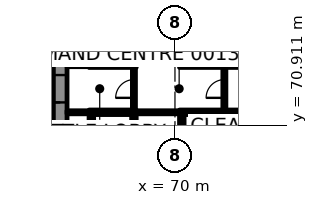
"""IFC4 building model, lengths in metres.
Left out: names, types, materials, properties, quantities, classifications, styles, units other than length and angle.
Written with IfcOpenShell. Run it as: python <this file> out.ifc"""

import sys

from ifc_helpers import new_model, si_unit, direction, frame, frame_2d, origin, place, context, subcontext, project, spatial, rectangle, extrude, element, fill, save


model = new_model("IFC4")
c1 = context("Model", 3, precision=1e-05, world=origin(), true_north=direction((0.0, 1.0)))
c2 = subcontext(c1, "Body", "Model", "MODEL_VIEW")
j1 = project(units=[si_unit("LENGTHUNIT", "METRE"), si_unit("PLANEANGLEUNIT", "RADIAN")], contexts=[c1])
p1 = place(None, origin())
s1 = spatial("IfcSite", under=j1, at=p1, CompositionType="ELEMENT")
p2 = place(p1, origin())
s2 = spatial("IfcBuilding", under=s1, at=p2, CompositionType="ELEMENT")
p3 = place(p2, origin())
s3 = spatial("IfcBuildingStorey", under=s2, at=p3, CompositionType="ELEMENT", Elevation=0.0)
p4 = place(p3, frame((62.45, 66.9, 0.0), z_axis=(0.0, 0.0, 1.0), x_axis=(0.0, 1.0, 0.0)))
e1 = element("IfcWall", 1, at=p4, inside=s3, PredefinedType="SHEAR", context=c2, shape_type="SweptSolid", body=[
    extrude(rectangle(XDim=16.2, YDim=0.9, at=frame_2d((8.1, 0.0))), origin(), (0.0, 0.0, 1.0), 7.7),
])
p5 = place(p4, frame((5.5, 0.0, 0.0)))
e2 = element("IfcOpeningElement", 2, at=p5, cuts=e1, PredefinedType="OPENING", context=c2, shape_type="SweptSolid", body=[
    extrude(rectangle(XDim=1.8, YDim=2.1, at=frame_2d((0.9, 1.05))), frame((0.0, 0.46, 0.0), z_axis=(0.0, -1.0, 0.0), x_axis=(1.0, 0.0, 0.0)), (0.0, 0.0, 1.0), 0.92),
])
p6 = place(p3, frame((64.35, 71.75, 0.0), z_axis=(0.0, 0.0, 1.0), x_axis=(1.0, 0.0, 0.0)))
e3 = element("IfcWall", 3, at=p6, inside=s3, PredefinedType="SHEAR", context=c2, shape_type="SweptSolid", body=[
    extrude(rectangle(XDim=3.1, YDim=0.3, at=frame_2d((1.55, 0.0))), origin(), (0.0, 0.0, 1.0), 7.7),
])
p7 = place(p6, frame((1.0, 0.0, 0.0)))
e4 = element("IfcOpeningElement", 4, at=p7, cuts=e3, PredefinedType="OPENING", context=c2, shape_type="SweptSolid", body=[
    extrude(rectangle(XDim=1.1, YDim=2.1, at=frame_2d((0.55, 1.05))), frame((0.0, 0.16, 0.0), z_axis=(0.0, -1.0, 0.0), x_axis=(1.0, 0.0, 0.0)), (0.0, 0.0, 1.0), 0.32),
])
p8 = place(p3, frame((70.3, 71.75, 0.0), z_axis=(0.0, 0.0, 1.0), x_axis=(1.0, 0.0, 0.0)))
e5 = element("IfcWall", 5, at=p8, inside=s3, PredefinedType="SHEAR", context=c2, shape_type="SweptSolid", body=[
    extrude(rectangle(XDim=16.8, YDim=0.3, at=frame_2d((8.4, 0.0))), origin(), (0.0, 0.0, 1.0), 7.7),
])
p9 = place(p8, frame((1.0, 0.0, 0.0)))
e6 = element("IfcOpeningElement", 6, at=p9, cuts=e5, PredefinedType="OPENING", context=c2, shape_type="SweptSolid", body=[
    extrude(rectangle(XDim=1.1, YDim=2.1, at=frame_2d((0.55, 1.05))), frame((0.0, 0.16, 0.0), z_axis=(0.0, -1.0, 0.0), x_axis=(1.0, 0.0, 0.0)), (0.0, 0.0, 1.0), 0.32),
])
p10 = place(p8, frame((3.8, 0.0, 0.0)))
e7 = element("IfcOpeningElement", 7, at=p10, cuts=e5, PredefinedType="OPENING", context=c2, shape_type="SweptSolid", body=[
    extrude(rectangle(XDim=1.1, YDim=2.1, at=frame_2d((0.55, 1.05))), frame((0.0, 0.16, 0.0), z_axis=(0.0, -1.0, 0.0), x_axis=(1.0, 0.0, 0.0)), (0.0, 0.0, 1.0), 0.32),
])
p11 = place(p8, frame((6.6, 0.0, 0.0)))
e8 = element("IfcOpeningElement", 8, at=p11, cuts=e5, PredefinedType="OPENING", context=c2, shape_type="SweptSolid", body=[
    extrude(rectangle(XDim=1.1, YDim=2.1, at=frame_2d((0.55, 1.05))), frame((0.0, 0.16, 0.0), z_axis=(0.0, -1.0, 0.0), x_axis=(1.0, 0.0, 0.0)), (0.0, 0.0, 1.0), 0.32),
])
p12 = place(p8, frame((9.4, 0.0, 0.0)))
e9 = element("IfcOpeningElement", 9, at=p12, cuts=e5, PredefinedType="OPENING", context=c2, shape_type="SweptSolid", body=[
    extrude(rectangle(XDim=1.1, YDim=2.1, at=frame_2d((0.55, 1.05))), frame((0.0, 0.16, 0.0), z_axis=(0.0, -1.0, 0.0), x_axis=(1.0, 0.0, 0.0)), (0.0, 0.0, 1.0), 0.32),
])
p13 = place(p8, frame((12.2, 0.0, 0.0)))
e10 = element("IfcOpeningElement", 10, at=p13, cuts=e5, PredefinedType="OPENING", context=c2, shape_type="SweptSolid", body=[
    extrude(rectangle(XDim=1.1, YDim=2.1, at=frame_2d((0.55, 1.05))), frame((0.0, 0.16, 0.0), z_axis=(0.0, -1.0, 0.0), x_axis=(1.0, 0.0, 0.0)), (0.0, 0.0, 1.0), 0.32),
])
p14 = place(p8, frame((14.925, 0.0, 0.0)))
e11 = element("IfcOpeningElement", 11, at=p14, cuts=e5, PredefinedType="OPENING", context=c2, shape_type="SweptSolid", body=[
    extrude(rectangle(XDim=1.1, YDim=2.1, at=frame_2d((0.55, 1.05))), frame((0.0, 0.16, 0.0), z_axis=(0.0, -1.0, 0.0), x_axis=(1.0, 0.0, 0.0)), (0.0, 0.0, 1.0), 0.32),
])
p15 = place(p3, frame((64.35, 74.85, 0.0), z_axis=(0.0, 0.0, 1.0), x_axis=(1.0, 0.0, 0.0)))
e12 = element("IfcWall", 12, at=p15, inside=s3, PredefinedType="SHEAR", context=c2, shape_type="SweptSolid", body=[
    extrude(rectangle(XDim=3.1, YDim=0.3, at=frame_2d((1.55, 0.0))), origin(), (0.0, 0.0, 1.0), 7.7),
])
p16 = place(p15, frame((1.0, 0.0, 0.0)))
e13 = element("IfcOpeningElement", 13, at=p16, cuts=e12, PredefinedType="OPENING", context=c2, shape_type="SweptSolid", body=[
    extrude(rectangle(XDim=1.1, YDim=2.1, at=frame_2d((0.55, 1.05))), frame((0.0, 0.16, 0.0), z_axis=(0.0, -1.0, 0.0), x_axis=(1.0, 0.0, 0.0)), (0.0, 0.0, 1.0), 0.32),
])
p17 = place(p3, frame((70.3, 74.85, 0.0), z_axis=(0.0, 0.0, 1.0), x_axis=(1.0, 0.0, 0.0)))
e14 = element("IfcWall", 14, at=p17, inside=s3, PredefinedType="SHEAR", context=c2, shape_type="SweptSolid", body=[
    extrude(rectangle(XDim=16.8, YDim=0.3, at=frame_2d((8.4, 0.0))), origin(), (0.0, 0.0, 1.0), 7.7),
])
p18 = place(p17, frame((3.8, 0.0, 0.0)))
e15 = element("IfcOpeningElement", 15, at=p18, cuts=e14, PredefinedType="OPENING", context=c2, shape_type="SweptSolid", body=[
    extrude(rectangle(XDim=1.1, YDim=2.1, at=frame_2d((0.55, 1.05))), frame((0.0, 0.16, 0.0), z_axis=(0.0, -1.0, 0.0), x_axis=(1.0, 0.0, 0.0)), (0.0, 0.0, 1.0), 0.32),
])
p19 = place(p17, frame((6.6, 0.0, 0.0)))
e16 = element("IfcOpeningElement", 16, at=p19, cuts=e14, PredefinedType="OPENING", context=c2, shape_type="SweptSolid", body=[
    extrude(rectangle(XDim=1.1, YDim=2.1, at=frame_2d((0.55, 1.05))), frame((0.0, 0.16, 0.0), z_axis=(0.0, -1.0, 0.0), x_axis=(1.0, 0.0, 0.0)), (0.0, 0.0, 1.0), 0.32),
])
p20 = place(p17, frame((9.4, 0.0, 0.0)))
e17 = element("IfcOpeningElement", 17, at=p20, cuts=e14, PredefinedType="OPENING", context=c2, shape_type="SweptSolid", body=[
    extrude(rectangle(XDim=1.1, YDim=2.1, at=frame_2d((0.55, 1.05))), frame((0.0, 0.16, 0.0), z_axis=(0.0, -1.0, 0.0), x_axis=(1.0, 0.0, 0.0)), (0.0, 0.0, 1.0), 0.32),
])
p21 = place(p17, frame((12.2, 0.0, 0.0)))
e18 = element("IfcOpeningElement", 18, at=p21, cuts=e14, PredefinedType="OPENING", context=c2, shape_type="SweptSolid", body=[
    extrude(rectangle(XDim=1.1, YDim=2.1, at=frame_2d((0.55, 1.05))), frame((0.0, 0.16, 0.0), z_axis=(0.0, -1.0, 0.0), x_axis=(1.0, 0.0, 0.0)), (0.0, 0.0, 1.0), 0.32),
])
p22 = place(p17, frame((14.925, 0.0, 0.0)))
e19 = element("IfcOpeningElement", 19, at=p22, cuts=e14, PredefinedType="OPENING", context=c2, shape_type="SweptSolid", body=[
    extrude(rectangle(XDim=1.1, YDim=2.1, at=frame_2d((0.55, 1.05))), frame((0.0, 0.16, 0.0), z_axis=(0.0, -1.0, 0.0), x_axis=(1.0, 0.0, 0.0)), (0.0, 0.0, 1.0), 0.32),
])
for number, where, z_axis, x_axis in (
    (20, (64.5, 69.0, 0.0), (0.0, 0.0, 1.0), (0.0, 1.0, 0.0)),
    (21, (64.5, 75.0, 0.0), (0.0, 0.0, 1.0), (0.0, 1.0, 0.0)),
    (22, (67.3, 69.0, 0.0), (0.0, 0.0, 1.0), (0.0, 1.0, 0.0)),
    (23, (67.3, 75.0, 0.0), (0.0, 0.0, 1.0), (0.0, 1.0, 0.0)),
    (24, (70.45, 69.0, 0.0), (0.0, 0.0, 1.0), (0.0, 1.0, 0.0)),
):
    element("IfcWall", number, at=place(p3, frame(where, z_axis=z_axis, x_axis=x_axis)), inside=s3, PredefinedType="SHEAR", context=c2, shape_type="SweptSolid", body=[
        extrude(rectangle(XDim=2.6, YDim=0.3, at=frame_2d((1.3, 0.0))), origin(), (0.0, 0.0, 1.0), 7.7),
    ])
p23 = place(p3, frame((70.45, 75.0, 0.0), z_axis=(0.0, 0.0, 1.0), x_axis=(0.0, 1.0, 0.0)))
e25 = element("IfcWall", 25, at=p23, inside=s3, PredefinedType="SHEAR", context=c2, shape_type="SweptSolid", body=[
    extrude(rectangle(XDim=2.6, YDim=0.3, at=frame_2d((1.3, 0.0))), origin(), (0.0, 0.0, 1.0), 7.7),
])
p24 = place(p23, frame((0.15, 0.0, 0.0)))
e26 = element("IfcOpeningElement", 26, at=p24, cuts=e25, PredefinedType="OPENING", context=c2, shape_type="SweptSolid", body=[
    extrude(rectangle(XDim=1.1, YDim=2.1, at=frame_2d((0.55, 1.05))), frame((0.0, 0.16, 0.0), z_axis=(0.0, -1.0, 0.0), x_axis=(1.0, 0.0, 0.0)), (0.0, 0.0, 1.0), 0.32),
])
for number, where, z_axis, x_axis in (
    (27, (73.25, 69.0, 0.0), (0.0, 0.0, 1.0), (0.0, 1.0, 0.0)),
    (28, (73.25, 75.0, 0.0), (0.0, 0.0, 1.0), (0.0, 1.0, 0.0)),
):
    element("IfcWall", number, at=place(p3, frame(where, z_axis=z_axis, x_axis=x_axis)), inside=s3, PredefinedType="SHEAR", context=c2, shape_type="SweptSolid", body=[
        extrude(rectangle(XDim=2.6, YDim=0.3, at=frame_2d((1.3, 0.0))), origin(), (0.0, 0.0, 1.0), 7.7),
    ])
p25 = place(p3, frame((71.348, 110.424, 0.0), z_axis=(0.0, 0.0, 1.0), x_axis=(-0.500000550228, -0.86602508611, 0.0)))
e29 = element("IfcWall", 29, at=p25, inside=s3, PredefinedType="SOLIDWALL", context=c2, shape_type="SweptSolid", body=[
    extrude(rectangle(XDim=57.704, YDim=0.3, at=frame_2d((28.852, 0.0))), origin(), (0.0, 0.0, 1.0), 7.7),
])
p26 = place(p25, frame((16.711, 0.0, 0.0)))
e30 = element("IfcOpeningElement", 30, at=p26, cuts=e29, PredefinedType="OPENING", context=c2, shape_type="SweptSolid", body=[
    extrude(rectangle(XDim=1.2, YDim=2.4, at=frame_2d((0.6, 1.2))), frame((0.0, 0.16, 0.0), z_axis=(0.0, -1.0, 0.0), x_axis=(1.0, 0.0, 0.0)), (0.0, 0.0, 1.0), 0.32),
])
p27 = place(p25, frame((1.552, 0.0, 0.15)))
e31 = element("IfcOpeningElement", 31, at=p27, cuts=e29, PredefinedType="OPENING", context=c2, shape_type="SweptSolid", body=[
    extrude(rectangle(XDim=2.1, YDim=5.4, at=frame_2d((1.05, 2.7))), frame((0.0, 0.16, 0.0), z_axis=(0.0, -1.0, 0.0), x_axis=(1.0, 0.0, 0.0)), (0.0, 0.0, 1.0), 0.32),
])
p28 = place(p25, frame((4.052, 0.0, 0.15)))
e32 = element("IfcOpeningElement", 32, at=p28, cuts=e29, PredefinedType="OPENING", context=c2, shape_type="SweptSolid", body=[
    extrude(rectangle(XDim=2.1, YDim=5.4, at=frame_2d((1.05, 2.7))), frame((0.0, 0.16, 0.0), z_axis=(0.0, -1.0, 0.0), x_axis=(1.0, 0.0, 0.0)), (0.0, 0.0, 1.0), 0.32),
])
p29 = place(p25, frame((6.552, 0.0, 0.15)))
e33 = element("IfcOpeningElement", 33, at=p29, cuts=e29, PredefinedType="OPENING", context=c2, shape_type="SweptSolid", body=[
    extrude(rectangle(XDim=2.1, YDim=5.4, at=frame_2d((1.05, 2.7))), frame((0.0, 0.16, 0.0), z_axis=(0.0, -1.0, 0.0), x_axis=(1.0, 0.0, 0.0)), (0.0, 0.0, 1.0), 0.32),
])
p30 = place(p25, frame((9.052, 0.0, 0.15)))
e34 = element("IfcOpeningElement", 34, at=p30, cuts=e29, PredefinedType="OPENING", context=c2, shape_type="SweptSolid", body=[
    extrude(rectangle(XDim=2.1, YDim=5.4, at=frame_2d((1.05, 2.7))), frame((0.0, 0.16, 0.0), z_axis=(0.0, -1.0, 0.0), x_axis=(1.0, 0.0, 0.0)), (0.0, 0.0, 1.0), 0.32),
])
p31 = place(p25, frame((11.552, 0.0, 0.15)))
e35 = element("IfcOpeningElement", 35, at=p31, cuts=e29, PredefinedType="OPENING", context=c2, shape_type="SweptSolid", body=[
    extrude(rectangle(XDim=2.1, YDim=5.4, at=frame_2d((1.05, 2.7))), frame((0.0, 0.16, 0.0), z_axis=(0.0, -1.0, 0.0), x_axis=(1.0, 0.0, 0.0)), (0.0, 0.0, 1.0), 0.32),
])
p32 = place(p25, frame((14.052, 0.0, 0.15)))
e36 = element("IfcOpeningElement", 36, at=p32, cuts=e29, PredefinedType="OPENING", context=c2, shape_type="SweptSolid", body=[
    extrude(rectangle(XDim=2.1, YDim=5.4, at=frame_2d((1.05, 2.7))), frame((0.0, 0.16, 0.0), z_axis=(0.0, -1.0, 0.0), x_axis=(1.0, 0.0, 0.0)), (0.0, 0.0, 1.0), 0.32),
])
p33 = place(p25, frame((19.052, 0.0, 0.15)))
e37 = element("IfcOpeningElement", 37, at=p33, cuts=e29, PredefinedType="OPENING", context=c2, shape_type="SweptSolid", body=[
    extrude(rectangle(XDim=2.1, YDim=5.4, at=frame_2d((1.05, 2.7))), frame((0.0, 0.16, 0.0), z_axis=(0.0, -1.0, 0.0), x_axis=(1.0, 0.0, 0.0)), (0.0, 0.0, 1.0), 0.32),
])
p34 = place(p25, frame((21.552, 0.0, 0.15)))
e38 = element("IfcOpeningElement", 38, at=p34, cuts=e29, PredefinedType="OPENING", context=c2, shape_type="SweptSolid", body=[
    extrude(rectangle(XDim=2.1, YDim=5.4, at=frame_2d((1.05, 2.7))), frame((0.0, 0.16, 0.0), z_axis=(0.0, -1.0, 0.0), x_axis=(1.0, 0.0, 0.0)), (0.0, 0.0, 1.0), 0.32),
])
p35 = place(p25, frame((24.052, 0.0, 0.15)))
e39 = element("IfcOpeningElement", 39, at=p35, cuts=e29, PredefinedType="OPENING", context=c2, shape_type="SweptSolid", body=[
    extrude(rectangle(XDim=2.1, YDim=5.4, at=frame_2d((1.05, 2.7))), frame((0.0, 0.16, 0.0), z_axis=(0.0, -1.0, 0.0), x_axis=(1.0, 0.0, 0.0)), (0.0, 0.0, 1.0), 0.32),
])
p36 = place(p25, frame((26.552, 0.0, 0.15)))
e40 = element("IfcOpeningElement", 40, at=p36, cuts=e29, PredefinedType="OPENING", context=c2, shape_type="SweptSolid", body=[
    extrude(rectangle(XDim=2.1, YDim=5.4, at=frame_2d((1.05, 2.7))), frame((0.0, 0.16, 0.0), z_axis=(0.0, -1.0, 0.0), x_axis=(1.0, 0.0, 0.0)), (0.0, 0.0, 1.0), 0.32),
])
p37 = place(p25, frame((29.052, 0.0, 0.15)))
e41 = element("IfcOpeningElement", 41, at=p37, cuts=e29, PredefinedType="OPENING", context=c2, shape_type="SweptSolid", body=[
    extrude(rectangle(XDim=2.1, YDim=5.4, at=frame_2d((1.05, 2.7))), frame((0.0, 0.16, 0.0), z_axis=(0.0, -1.0, 0.0), x_axis=(1.0, 0.0, 0.0)), (0.0, 0.0, 1.0), 0.32),
])
p38 = place(p25, frame((31.552, 0.0, 0.15)))
e42 = element("IfcOpeningElement", 42, at=p38, cuts=e29, PredefinedType="OPENING", context=c2, shape_type="SweptSolid", body=[
    extrude(rectangle(XDim=2.1, YDim=5.4, at=frame_2d((1.05, 2.7))), frame((0.0, 0.16, 0.0), z_axis=(0.0, -1.0, 0.0), x_axis=(1.0, 0.0, 0.0)), (0.0, 0.0, 1.0), 0.32),
])
p39 = place(p25, frame((34.052, 0.0, 0.15)))
e43 = element("IfcOpeningElement", 43, at=p39, cuts=e29, PredefinedType="OPENING", context=c2, shape_type="SweptSolid", body=[
    extrude(rectangle(XDim=2.1, YDim=5.4, at=frame_2d((1.05, 2.7))), frame((0.0, 0.16, 0.0), z_axis=(0.0, -1.0, 0.0), x_axis=(1.0, 0.0, 0.0)), (0.0, 0.0, 1.0), 0.32),
])
p40 = place(p25, frame((36.552, 0.0, 0.15)))
e44 = element("IfcOpeningElement", 44, at=p40, cuts=e29, PredefinedType="OPENING", context=c2, shape_type="SweptSolid", body=[
    extrude(rectangle(XDim=2.1, YDim=5.4, at=frame_2d((1.05, 2.7))), frame((0.0, 0.16, 0.0), z_axis=(0.0, -1.0, 0.0), x_axis=(1.0, 0.0, 0.0)), (0.0, 0.0, 1.0), 0.32),
])
p41 = place(p25, frame((39.052, 0.0, 0.15)))
e45 = element("IfcOpeningElement", 45, at=p41, cuts=e29, PredefinedType="OPENING", context=c2, shape_type="SweptSolid", body=[
    extrude(rectangle(XDim=2.1, YDim=5.4, at=frame_2d((1.05, 2.7))), frame((0.0, 0.16, 0.0), z_axis=(0.0, -1.0, 0.0), x_axis=(1.0, 0.0, 0.0)), (0.0, 0.0, 1.0), 0.32),
])
p42 = place(p25, frame((41.552, 0.0, 0.15)))
e46 = element("IfcOpeningElement", 46, at=p42, cuts=e29, PredefinedType="OPENING", context=c2, shape_type="SweptSolid", body=[
    extrude(rectangle(XDim=2.1, YDim=5.4, at=frame_2d((1.05, 2.7))), frame((0.0, 0.16, 0.0), z_axis=(0.0, -1.0, 0.0), x_axis=(1.0, 0.0, 0.0)), (0.0, 0.0, 1.0), 0.32),
])
p43 = place(p25, frame((44.052, 0.0, 0.15)))
e47 = element("IfcOpeningElement", 47, at=p43, cuts=e29, PredefinedType="OPENING", context=c2, shape_type="SweptSolid", body=[
    extrude(rectangle(XDim=2.1, YDim=5.4, at=frame_2d((1.05, 2.7))), frame((0.0, 0.16, 0.0), z_axis=(0.0, -1.0, 0.0), x_axis=(1.0, 0.0, 0.0)), (0.0, 0.0, 1.0), 0.32),
])
p44 = place(p25, frame((46.552, 0.0, 0.15)))
e48 = element("IfcOpeningElement", 48, at=p44, cuts=e29, PredefinedType="OPENING", context=c2, shape_type="SweptSolid", body=[
    extrude(rectangle(XDim=2.1, YDim=5.4, at=frame_2d((1.05, 2.7))), frame((0.0, 0.16, 0.0), z_axis=(0.0, -1.0, 0.0), x_axis=(1.0, 0.0, 0.0)), (0.0, 0.0, 1.0), 0.32),
])
p45 = place(p25, frame((49.052, 0.0, 0.15)))
e49 = element("IfcOpeningElement", 49, at=p45, cuts=e29, PredefinedType="OPENING", context=c2, shape_type="SweptSolid", body=[
    extrude(rectangle(XDim=2.1, YDim=5.4, at=frame_2d((1.05, 2.7))), frame((0.0, 0.16, 0.0), z_axis=(0.0, -1.0, 0.0), x_axis=(1.0, 0.0, 0.0)), (0.0, 0.0, 1.0), 0.32),
])
p46 = place(p25, frame((51.552, 0.0, 0.15)))
e50 = element("IfcOpeningElement", 50, at=p46, cuts=e29, PredefinedType="OPENING", context=c2, shape_type="SweptSolid", body=[
    extrude(rectangle(XDim=2.1, YDim=5.4, at=frame_2d((1.05, 2.7))), frame((0.0, 0.16, 0.0), z_axis=(0.0, -1.0, 0.0), x_axis=(1.0, 0.0, 0.0)), (0.0, 0.0, 1.0), 0.32),
])
p47 = place(p25, frame((54.052, 0.0, 0.15)))
e51 = element("IfcOpeningElement", 51, at=p47, cuts=e29, PredefinedType="OPENING", context=c2, shape_type="SweptSolid", body=[
    extrude(rectangle(XDim=2.1, YDim=5.4, at=frame_2d((1.05, 2.7))), frame((0.0, 0.16, 0.0), z_axis=(0.0, -1.0, 0.0), x_axis=(1.0, 0.0, 0.0)), (0.0, 0.0, 1.0), 0.32),
])
p48 = place(p3, frame((62.9, 71.75, 0.0), z_axis=(0.0, 0.0, 1.0), x_axis=(1.0, 0.0, 0.0)))
e52 = element("IfcWall", 52, at=p48, inside=s3, PredefinedType="PARTITIONING", context=c2, shape_type="SweptSolid", body=[
    extrude(rectangle(XDim=1.45, YDim=0.2, at=frame_2d((0.725, 0.0))), origin(), (0.0, 0.0, 1.0), 7.7),
])
p49 = place(p3, frame((67.45, 71.75, 0.0), z_axis=(0.0, 0.0, 1.0), x_axis=(1.0, 0.0, 0.0)))
e53 = element("IfcWall", 53, at=p49, inside=s3, PredefinedType="PARTITIONING", context=c2, shape_type="SweptSolid", body=[
    extrude(rectangle(XDim=2.85, YDim=0.2, at=frame_2d((1.425, 0.0))), origin(), (0.0, 0.0, 1.0), 7.7),
])
p50 = place(p3, frame((62.9, 74.85, 0.0), z_axis=(0.0, 0.0, 1.0), x_axis=(1.0, 0.0, 0.0)))
e54 = element("IfcWall", 54, at=p50, inside=s3, PredefinedType="PARTITIONING", context=c2, shape_type="SweptSolid", body=[
    extrude(rectangle(XDim=1.45, YDim=0.2, at=frame_2d((0.725, 0.0))), origin(), (0.0, 0.0, 1.0), 7.7),
])
p51 = place(p3, frame((67.3, 71.9, 0.0), z_axis=(0.0, 0.0, 1.0), x_axis=(0.0, 1.0, 0.0)))
e55 = element("IfcWall", 55, at=p51, inside=s3, PredefinedType="PARTITIONING", context=c2, shape_type="SweptSolid", body=[
    extrude(rectangle(XDim=2.8, YDim=0.2, at=frame_2d((1.4, 0.0))), origin(), (0.0, 0.0, 1.0), 7.7),
])
p52 = place(p51, frame((0.8, 0.0, 0.0)))
e56 = element("IfcOpeningElement", 56, at=p52, cuts=e55, PredefinedType="OPENING", context=c2, shape_type="SweptSolid", body=[
    extrude(rectangle(XDim=1.2, YDim=2.1, at=frame_2d((0.6, 1.05))), frame((0.0, 0.11, 0.0), z_axis=(0.0, -1.0, 0.0), x_axis=(1.0, 0.0, 0.0)), (0.0, 0.0, 1.0), 0.22),
])
p53 = place(p3, frame((73.25, 71.9, 0.0), z_axis=(0.0, 0.0, 1.0), x_axis=(0.0, 1.0, 0.0)))
e57 = element("IfcWall", 57, at=p53, inside=s3, PredefinedType="PARTITIONING", context=c2, shape_type="SweptSolid", body=[
    extrude(rectangle(XDim=2.8, YDim=0.2, at=frame_2d((1.4, 0.0))), origin(), (0.0, 0.0, 1.0), 7.7),
])
p54 = place(p53, frame((0.8, 0.0, 0.0)))
e58 = element("IfcOpeningElement", 58, at=p54, cuts=e57, PredefinedType="OPENING", context=c2, shape_type="SweptSolid", body=[
    extrude(rectangle(XDim=1.2, YDim=2.1, at=frame_2d((0.6, 1.05))), frame((0.0, 0.11, 0.0), z_axis=(0.0, -1.0, 0.0), x_axis=(1.0, 0.0, 0.0)), (0.0, 0.0, 1.0), 0.22),
])
p55 = place(p7, origin())
e59 = element("IfcDoor", 59, at=p55, inside=s3, OperationType="DOUBLE_DOOR_SLIDING", PredefinedType="DOOR", context=c2, shape_type="SweptSolid", body=[
    extrude(rectangle(XDim=1.1, YDim=2.1, at=frame_2d((0.55, 1.05))), frame((0.0, 0.025, 0.0), z_axis=(0.0, -1.0, 0.0), x_axis=(1.0, 0.0, 0.0)), (0.0, 0.0, 1.0), 0.05),
])
fill(e4, e59)
p56 = place(p9, origin())
e60 = element("IfcDoor", 60, at=p56, inside=s3, OperationType="DOUBLE_DOOR_SLIDING", PredefinedType="DOOR", context=c2, shape_type="SweptSolid", body=[
    extrude(rectangle(XDim=1.1, YDim=2.1, at=frame_2d((0.55, 1.05))), frame((0.0, 0.025, 0.0), z_axis=(0.0, -1.0, 0.0), x_axis=(1.0, 0.0, 0.0)), (0.0, 0.0, 1.0), 0.05),
])
fill(e6, e60)
p57 = place(p10, origin())
e61 = element("IfcDoor", 61, at=p57, inside=s3, OperationType="DOUBLE_DOOR_SLIDING", PredefinedType="DOOR", context=c2, shape_type="SweptSolid", body=[
    extrude(rectangle(XDim=1.1, YDim=2.1, at=frame_2d((0.55, 1.05))), frame((0.0, 0.025, 0.0), z_axis=(0.0, -1.0, 0.0), x_axis=(1.0, 0.0, 0.0)), (0.0, 0.0, 1.0), 0.05),
])
fill(e7, e61)
p58 = place(p16, origin())
e62 = element("IfcDoor", 62, at=p58, inside=s3, OperationType="DOUBLE_DOOR_SLIDING", PredefinedType="DOOR", context=c2, shape_type="SweptSolid", body=[
    extrude(rectangle(XDim=1.1, YDim=2.1, at=frame_2d((0.55, 1.05))), frame((0.0, 0.025, 0.0), z_axis=(0.0, -1.0, 0.0), x_axis=(1.0, 0.0, 0.0)), (0.0, 0.0, 1.0), 0.05),
])
fill(e13, e62)
p59 = place(p24, origin())
e63 = element("IfcDoor", 63, at=p59, inside=s3, OperationType="DOUBLE_DOOR_SLIDING", PredefinedType="DOOR", context=c2, shape_type="SweptSolid", body=[
    extrude(rectangle(XDim=1.1, YDim=2.1, at=frame_2d((0.55, 1.05))), frame((0.0, 0.025, 0.0), z_axis=(0.0, -1.0, 0.0), x_axis=(1.0, 0.0, 0.0)), (0.0, 0.0, 1.0), 0.05),
])
fill(e26, e63)
p60 = place(p18, origin())
e64 = element("IfcDoor", 64, at=p60, inside=s3, OperationType="DOUBLE_DOOR_SLIDING", PredefinedType="DOOR", context=c2, shape_type="SweptSolid", body=[
    extrude(rectangle(XDim=1.1, YDim=2.1, at=frame_2d((0.55, 1.05))), frame((0.0, 0.025, 0.0), z_axis=(0.0, -1.0, 0.0), x_axis=(1.0, 0.0, 0.0)), (0.0, 0.0, 1.0), 0.05),
])
fill(e15, e64)
p61 = place(p54, origin())
e65 = element("IfcDoor", 65, at=p61, inside=s3, OperationType="SINGLE_SWING_LEFT", PredefinedType="DOOR", context=c2, shape_type="SweptSolid", body=[
    extrude(rectangle(XDim=1.2, YDim=2.1, at=frame_2d((0.6, 1.05))), frame((0.0, 0.025, 0.0), z_axis=(0.0, -1.0, 0.0), x_axis=(1.0, 0.0, 0.0)), (0.0, 0.0, 1.0), 0.05),
])
fill(e58, e65)
p62 = place(p52, origin())
e66 = element("IfcDoor", 66, at=p62, inside=s3, OperationType="SINGLE_SWING_RIGHT", PredefinedType="DOOR", context=c2, shape_type="SweptSolid", body=[
    extrude(rectangle(XDim=1.2, YDim=2.1, at=frame_2d((0.6, 1.05))), frame((0.0, 0.025, 0.0), z_axis=(0.0, -1.0, 0.0), x_axis=(1.0, 0.0, 0.0)), (0.0, 0.0, 1.0), 0.05),
])
fill(e56, e66)
p63 = place(p5, origin())
e67 = element("IfcDoor", 67, at=p63, inside=s3, OperationType="SINGLE_SWING_LEFT", PredefinedType="DOOR", context=c2, shape_type="SweptSolid", body=[
    extrude(rectangle(XDim=1.8, YDim=2.1, at=frame_2d((0.9, 1.05))), frame((0.0, 0.17, 0.0), z_axis=(0.0, -1.0, 0.0), x_axis=(1.0, 0.0, 0.0)), (0.0, 0.0, 1.0), 0.34),
])
fill(e2, e67)
save(model, sys.argv[1])
